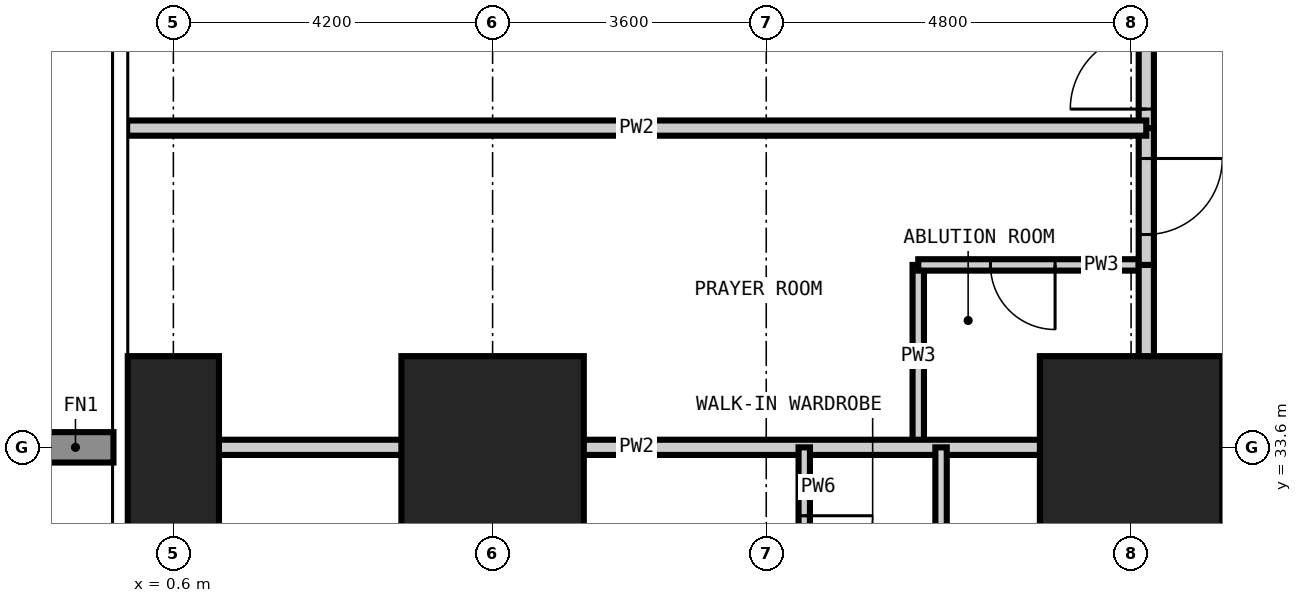
"""IFC4 building model, lengths in metres.
Left out: names, types, materials, properties, quantities, classifications, styles, units other than length and angle.
Written with IfcOpenShell. Run it as: python <this file> out.ifc"""

import sys

from ifc_helpers import new_model, si_unit, direction, frame, frame_2d, origin, origin_2d, place, context, subcontext, project, spatial, rectangle, extrude, element, fill, save


model = new_model("IFC4")
c1 = context("Model", 3, precision=1e-05, world=origin(), true_north=direction((0.0, 1.0)))
c2 = subcontext(c1, "Body", "Model", "MODEL_VIEW")
j1 = project(units=[si_unit("LENGTHUNIT", "METRE"), si_unit("PLANEANGLEUNIT", "RADIAN")], contexts=[c1])
p1 = place(None, origin())
s1 = spatial("IfcSite", under=j1, at=p1, CompositionType="ELEMENT")
p2 = place(p1, origin())
s2 = spatial("IfcBuilding", under=s1, at=p2, CompositionType="ELEMENT")
p3 = place(p2, frame((0.0, 0.0, 84.6)))
s3 = spatial("IfcBuildingStorey", under=s2, at=p3, CompositionType="ELEMENT", Elevation=84.6)
p4 = place(p3, frame((0.6, 33.6, -0.35), z_axis=(0.0, 0.0, 1.0), x_axis=(1.0, 0.0, 0.0)))
e1 = element("IfcColumn", 1, at=p4, inside=s3, PredefinedType="COLUMN", context=c2, shape_type="SweptSolid", body=[
    extrude(rectangle(XDim=1.2, YDim=2.4, at=origin_2d()), origin(), (0.0, 0.0, 1.0), 3.55),
])
for number, where, z_axis, x_axis in (
    (2, (4.8, 33.6, -0.35), (0.0, 0.0, 1.0), (1.0, 0.0, 0.0)),
    (3, (13.2, 33.6, -0.35), (0.0, 0.0, 1.0), (1.0, 0.0, 0.0)),
):
    element("IfcColumn", number, at=place(p3, frame(where, z_axis=z_axis, x_axis=x_axis)), inside=s3, PredefinedType="COLUMN", context=c2, shape_type="SweptSolid", body=[
        extrude(rectangle(XDim=2.4, YDim=2.4, at=origin_2d()), origin(), (0.0, 0.0, 1.0), 3.55),
    ])
p5 = place(p3, frame((10.4, 33.6, 0.0), z_axis=(0.0, 0.0, 1.0), x_axis=(0.0, 1.0, 0.0)))
e4 = element("IfcWall", 4, at=p5, inside=s3, PredefinedType="PARTITIONING", context=c2, shape_type="SweptSolid", body=[
    extrude(rectangle(XDim=2.4, YDim=0.15, at=frame_2d((1.2, 0.0))), origin(), (0.0, 0.0, 1.0), 3.2),
])
p6 = place(p3, frame((10.4, 36.0, 0.0), z_axis=(0.0, 0.0, 1.0), x_axis=(1.0, 0.0, 0.0)))
e5 = element("IfcWall", 5, at=p6, inside=s3, PredefinedType="PARTITIONING", context=c2, shape_type="SweptSolid", body=[
    extrude(rectangle(XDim=3.0, YDim=0.15, at=frame_2d((1.5, 0.0))), origin(), (0.0, 0.0, 1.0), 3.2),
])
p7 = place(p6, frame((0.95, 0.0, 0.0)))
e6 = element("IfcOpeningElement", 6, at=p7, cuts=e5, PredefinedType="OPENING", context=c2, shape_type="SweptSolid", body=[
    extrude(rectangle(XDim=0.85, YDim=2.1, at=frame_2d((0.425, 1.05))), frame((0.0, 0.085, 0.0), z_axis=(0.0, -1.0, 0.0), x_axis=(1.0, 0.0, 0.0)), (0.0, 0.0, 1.0), 0.17),
])
p8 = place(p3, frame((13.4, 13.4, 0.0), z_axis=(0.0, 0.0, 1.0), x_axis=(0.0, 1.0, 0.0)))
e7 = element("IfcWall", 7, at=p8, inside=s3, PredefinedType="PARTITIONING", context=c2, shape_type="SweptSolid", body=[
    extrude(rectangle(XDim=22.6, YDim=0.2, at=frame_2d((11.3, 0.0))), origin(), (0.0, 0.0, 1.0), 3.2),
])
p9 = place(p8, frame((6.35, 0.0, 0.0)))
e8 = element("IfcOpeningElement", 8, at=p9, cuts=e7, PredefinedType="OPENING", context=c2, shape_type="SweptSolid", body=[
    extrude(rectangle(XDim=1.0, YDim=2.2, at=frame_2d((0.5, 1.1))), frame((0.0, 0.11, 0.0), z_axis=(0.0, -1.0, 0.0), x_axis=(1.0, 0.0, 0.0)), (0.0, 0.0, 1.0), 0.22),
])
p10 = place(p8, frame((13.1, 0.0, 0.0)))
e9 = element("IfcOpeningElement", 9, at=p10, cuts=e7, PredefinedType="OPENING", context=c2, shape_type="SweptSolid", body=[
    extrude(rectangle(XDim=1.0, YDim=2.2, at=frame_2d((0.5, 1.1))), frame((0.0, 0.11, 0.0), z_axis=(0.0, -1.0, 0.0), x_axis=(1.0, 0.0, 0.0)), (0.0, 0.0, 1.0), 0.22),
])
p11 = place(p8, frame((16.25, 0.0, 0.0)))
e10 = element("IfcOpeningElement", 10, at=p11, cuts=e7, PredefinedType="OPENING", context=c2, shape_type="SweptSolid", body=[
    extrude(rectangle(XDim=1.0, YDim=2.2, at=frame_2d((0.5, 1.1))), frame((0.0, 0.11, 0.0), z_axis=(0.0, -1.0, 0.0), x_axis=(1.0, 0.0, 0.0)), (0.0, 0.0, 1.0), 0.22),
])
p12 = place(p8, frame((1.1, 0.0, 0.0)))
e11 = element("IfcOpeningElement", 11, at=p12, cuts=e7, PredefinedType="OPENING", context=c2, shape_type="SweptSolid", body=[
    extrude(rectangle(XDim=1.0, YDim=2.2, at=frame_2d((0.5, 1.1))), frame((0.0, 0.11, 0.0), z_axis=(0.0, -1.0, 0.0), x_axis=(1.0, 0.0, 0.0)), (0.0, 0.0, 1.0), 0.22),
])
p13 = place(p3, frame((13.4, 37.8, 0.0), z_axis=(0.0, 0.0, 1.0), x_axis=(0.0, 1.0, 0.0)))
e12 = element("IfcWall", 12, at=p13, inside=s3, PredefinedType="PARTITIONING", context=c2, shape_type="SweptSolid", body=[
    extrude(rectangle(XDim=7.0, YDim=0.2, at=frame_2d((3.5, 0.0))), origin(), (0.0, 0.0, 1.0), 3.2),
])
p14 = place(p13, frame((0.25, 0.0, 0.0)))
e13 = element("IfcOpeningElement", 13, at=p14, cuts=e12, PredefinedType="OPENING", context=c2, shape_type="SweptSolid", body=[
    extrude(rectangle(XDim=1.0, YDim=2.2, at=frame_2d((0.5, 1.1))), frame((0.0, 0.11, 0.0), z_axis=(0.0, -1.0, 0.0), x_axis=(1.0, 0.0, 0.0)), (0.0, 0.0, 1.0), 0.22),
])
p15 = place(p13, frame((5.5, 0.0, 0.0)))
e14 = element("IfcOpeningElement", 14, at=p15, cuts=e12, PredefinedType="OPENING", context=c2, shape_type="SweptSolid", body=[
    extrude(rectangle(XDim=1.0, YDim=2.2, at=frame_2d((0.5, 1.1))), frame((0.0, 0.11, 0.0), z_axis=(0.0, -1.0, 0.0), x_axis=(1.0, 0.0, 0.0)), (0.0, 0.0, 1.0), 0.22),
])
p16 = place(p3, frame((13.4, 37.8, 0.0), z_axis=(0.0, 0.0, 1.0), x_axis=(0.0, -1.0, 0.0)))
e15 = element("IfcWall", 15, at=p16, inside=s3, PredefinedType="PARTITIONING", context=c2, shape_type="SweptSolid", body=[
    extrude(rectangle(XDim=1.8, YDim=0.2, at=frame_2d((0.9, 0.0))), origin(), (0.0, 0.0, 1.0), 3.2),
])
p17 = place(p16, frame((0.4, 0.0, 0.0)))
e16 = element("IfcOpeningElement", 16, at=p17, cuts=e15, PredefinedType="OPENING", context=c2, shape_type="SweptSolid", body=[
    extrude(rectangle(XDim=1.0, YDim=2.2, at=frame_2d((0.5, 1.1))), frame((0.0, 0.11, 0.0), z_axis=(0.0, -1.0, 0.0), x_axis=(1.0, 0.0, 0.0)), (0.0, 0.0, 1.0), 0.22),
])
for number, where, z_axis, x_axis in (
    (17, (-0.008, 33.6, 0.0), (0.0, 0.0, 1.0), (1.0, 0.0, 0.0)),
    (18, (-0.008, 37.8, 0.0), (0.0, 0.0, 1.0), (1.0, 0.0, 0.0)),
):
    element("IfcWall", number, at=place(p3, frame(where, z_axis=z_axis, x_axis=x_axis)), inside=s3, PredefinedType="PARTITIONING", context=c2, shape_type="SweptSolid", body=[
        extrude(rectangle(XDim=13.408, YDim=0.2, at=frame_2d((6.704, 0.0))), origin(), (0.0, 0.0, 1.0), 3.2),
    ])
p18 = place(p3, frame((8.9, 30.9, 0.0), z_axis=(0.0, 0.0, 1.0), x_axis=(0.0, 1.0, 0.0)))
e19 = element("IfcWall", 19, at=p18, inside=s3, PredefinedType="PARTITIONING", context=c2, shape_type="SweptSolid", body=[
    extrude(rectangle(XDim=2.7, YDim=0.15, at=frame_2d((1.35, 0.0))), origin(), (0.0, 0.0, 1.0), 3.2),
])
p19 = place(p18, frame((0.9, 0.0, 0.0)))
e20 = element("IfcOpeningElement", 20, at=p19, cuts=e19, PredefinedType="OPENING", context=c2, shape_type="SweptSolid", body=[
    extrude(rectangle(XDim=0.9, YDim=2.1, at=frame_2d((0.45, 1.05))), frame((0.0, 0.085, 0.0), z_axis=(0.0, -1.0, 0.0), x_axis=(1.0, 0.0, 0.0)), (0.0, 0.0, 1.0), 0.17),
])
p20 = place(p3, frame((10.7, 30.9, 0.0), z_axis=(0.0, 0.0, 1.0), x_axis=(0.0, 1.0, 0.0)))
e21 = element("IfcWall", 21, at=p20, inside=s3, PredefinedType="PARTITIONING", context=c2, shape_type="SweptSolid", body=[
    extrude(rectangle(XDim=2.7, YDim=0.15, at=frame_2d((1.35, 0.0))), origin(), (0.0, 0.0, 1.0), 3.2),
])
p21 = place(p19, frame((0.9, 0.0, 0.0), z_axis=(0.0, 0.0, 1.0), x_axis=(-1.0, 0.0, 0.0)))
e22 = element("IfcDoor", 22, at=p21, inside=s3, OperationType="SINGLE_SWING_LEFT", PredefinedType="DOOR", context=c2, shape_type="SweptSolid", body=[
    extrude(rectangle(XDim=0.9, YDim=2.1, at=frame_2d((0.45, 1.05))), frame((0.0, 0.025, 0.0), z_axis=(0.0, -1.0, 0.0), x_axis=(1.0, 0.0, 0.0)), (0.0, 0.0, 1.0), 0.05),
])
fill(e20, e22)
p22 = place(p17, origin())
e23 = element("IfcDoor", 23, at=p22, inside=s3, OperationType="SINGLE_SWING_LEFT", PredefinedType="DOOR", context=c2, shape_type="SweptSolid", body=[
    extrude(rectangle(XDim=1.0, YDim=2.2, at=frame_2d((0.5, 1.1))), frame((0.0, 0.025, 0.0), z_axis=(0.0, -1.0, 0.0), x_axis=(1.0, 0.0, 0.0)), (0.0, 0.0, 1.0), 0.05),
])
fill(e16, e23)
p23 = place(p7, frame((0.85, 0.0, 0.0), z_axis=(0.0, 0.0, 1.0), x_axis=(-1.0, 0.0, 0.0)))
e24 = element("IfcDoor", 24, at=p23, inside=s3, OperationType="SINGLE_SWING_LEFT", PredefinedType="DOOR", context=c2, shape_type="SweptSolid", body=[
    extrude(rectangle(XDim=0.85, YDim=2.1, at=frame_2d((0.425, 1.05))), frame((0.0, 0.025, 0.0), z_axis=(0.0, -1.0, 0.0), x_axis=(1.0, 0.0, 0.0)), (0.0, 0.0, 1.0), 0.05),
])
fill(e6, e24)
p24 = place(p14, origin())
e25 = element("IfcDoor", 25, at=p24, inside=s3, OperationType="SINGLE_SWING_LEFT", PredefinedType="DOOR", context=c2, shape_type="SweptSolid", body=[
    extrude(rectangle(XDim=1.0, YDim=2.2, at=frame_2d((0.5, 1.1))), frame((0.0, 0.025, 0.0), z_axis=(0.0, -1.0, 0.0), x_axis=(1.0, 0.0, 0.0)), (0.0, 0.0, 1.0), 0.05),
])
fill(e13, e25)
save(model, sys.argv[1])
